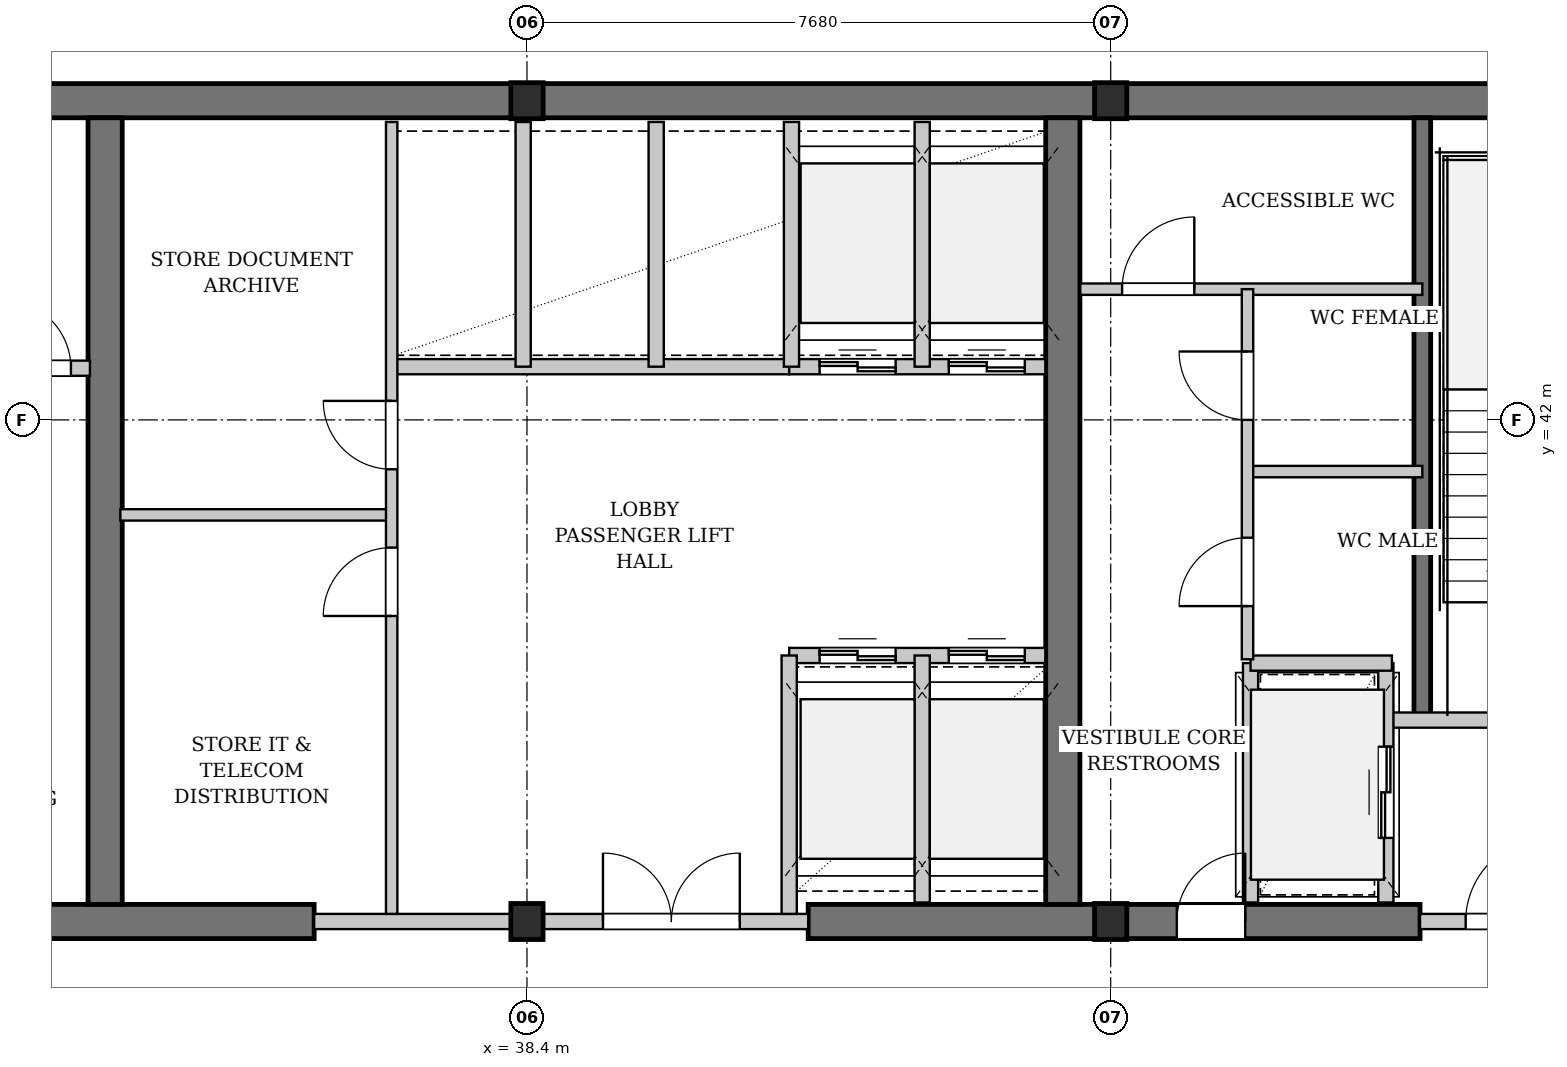
"""IFC4 building model, lengths in metres.
Left out: names, types, materials, properties, quantities, classifications, styles, units other than length and angle.
Written with IfcOpenShell. Run it as: python <this file> out.ifc"""

import sys

from ifc_helpers import new_model, si_unit, direction, frame, frame_2d, origin, origin_2d, place, context, subcontext, project, spatial, rectangle, i_section, extrude, element, fill, save


model = new_model("IFC4")
c1 = context("Model", 3, precision=1e-05, world=origin(), true_north=direction((0.0, 1.0)))
c2 = subcontext(c1, "Body", "Model", "MODEL_VIEW")
j1 = project(units=[si_unit("LENGTHUNIT", "METRE"), si_unit("PLANEANGLEUNIT", "RADIAN")], contexts=[c1])
p1 = place(None, origin())
s1 = spatial("IfcSite", under=j1, at=p1, CompositionType="ELEMENT")
p2 = place(p1, origin())
s2 = spatial("IfcBuilding", under=s1, at=p2, CompositionType="ELEMENT")
p3 = place(p2, frame((0.0, 0.0, 145.1)))
s3 = spatial("IfcBuildingStorey", under=s2, at=p3, CompositionType="ELEMENT", Elevation=145.1)
p4 = place(p3, frame((22.815, 46.2, 0.0), z_axis=(0.0, 0.0, 1.0), x_axis=(1.0, 0.0, 0.0)))
e1 = element("IfcWall", 1, at=p4, inside=s3, PredefinedType="SHEAR", context=c2, shape_type="SweptSolid", body=[
    extrude(rectangle(XDim=31.17, YDim=0.45, at=frame_2d((15.585, 0.0))), origin(), (0.0, 0.0, 1.0), 3.48),
])
p5 = place(p3, frame((30.72, 35.4, 0.0), z_axis=(0.0, 0.0, 1.0), x_axis=(1.0, 0.0, 0.0)))
e2 = element("IfcWall", 2, at=p5, inside=s3, PredefinedType="SHEAR", context=c2, shape_type="SweptSolid", body=[
    extrude(rectangle(XDim=4.88, YDim=0.45, at=frame_2d((2.44, 0.0))), origin(), (0.0, 0.0, 1.0), 3.48),
])
p6 = place(p3, frame((42.1, 35.4, 0.0), z_axis=(0.0, 0.0, 1.0), x_axis=(1.0, 0.0, 0.0)))
e3 = element("IfcWall", 3, at=p6, inside=s3, PredefinedType="SHEAR", context=c2, shape_type="SweptSolid", body=[
    extrude(rectangle(XDim=8.05, YDim=0.45, at=frame_2d((4.025, 0.0))), origin(), (0.0, 0.0, 1.0), 3.48),
])
p7 = place(p6, frame((4.85, 0.0, 0.0)))
e4 = element("IfcOpeningElement", 4, at=p7, cuts=e3, PredefinedType="OPENING", context=c2, shape_type="SweptSolid", body=[
    extrude(rectangle(XDim=0.9, YDim=2.15, at=frame_2d((0.45, 1.075))), frame((0.0, 0.235, 0.0), z_axis=(0.0, -1.0, 0.0), x_axis=(1.0, 0.0, 0.0)), (0.0, 0.0, 1.0), 0.47),
])
for number, where, z_axis, x_axis in (
    (5, (32.85, 35.625, 0.0), (0.0, 0.0, 1.0), (0.0, 1.0, 0.0)),
    (6, (45.45, 35.625, 0.0), (0.0, 0.0, 1.0), (0.0, 1.0, 0.0)),
):
    element("IfcWall", number, at=place(p3, frame(where, z_axis=z_axis, x_axis=x_axis)), inside=s3, PredefinedType="SHEAR", context=c2, shape_type="SweptSolid", body=[
        extrude(rectangle(XDim=10.35, YDim=0.45, at=frame_2d((5.175, 0.0))), origin(), (0.0, 0.0, 1.0), 3.48),
    ])
p8 = place(p3, frame((50.18, 38.05, 0.0), z_axis=(0.0, 0.0, 1.0), x_axis=(0.0, 1.0, 0.0)))
e7 = element("IfcWall", 7, at=p8, inside=s3, PredefinedType="SHEAR", context=c2, shape_type="SweptSolid", body=[
    extrude(rectangle(XDim=7.925, YDim=0.22, at=frame_2d((3.962, 0.0))), origin(), (0.0, 0.0, 1.0), 3.48),
])
for number, where, z_axis, x_axis in (
    (8, (38.4, 35.4, 0.0), (0.0, 0.0, 1.0), (1.0, 0.0, 0.0)),
    (9, (38.4, 46.2, 0.0), (0.0, 0.0, 1.0), (1.0, 0.0, 0.0)),
    (10, (46.08, 35.4, 0.0), (0.0, 0.0, 1.0), (1.0, 0.0, 0.0)),
    (11, (46.08, 46.2, 0.0), (0.0, 0.0, 1.0), (1.0, 0.0, 0.0)),
):
    element("IfcColumn", number, at=place(p3, frame(where, z_axis=z_axis, x_axis=x_axis)), inside=s3, PredefinedType="COLUMN", context=c2, shape_type="SweptSolid", body=[
        extrude(i_section(OverallWidth=0.424, OverallDepth=0.474, WebThickness=0.047, FlangeThickness=0.077, FilletRadius=0.015, at=origin_2d()), origin(), (0.0, 0.0, 1.0), 3.9),
    ])
p9 = place(p3, frame((27.32, 42.68, 0.0), z_axis=(0.0, 0.0, 1.0), x_axis=(1.0, 0.0, 0.0)))
e12 = element("IfcWall", 12, at=p9, inside=s3, PredefinedType="PARTITIONING", context=c2, shape_type="SweptSolid", body=[
    extrude(rectangle(XDim=5.33, YDim=0.2, at=frame_2d((2.665, 0.0))), origin(), (0.0, 0.0, 1.0), 3.48),
])
p10 = place(p9, frame((4.18, 0.0, 0.0)))
e13 = element("IfcOpeningElement", 13, at=p10, cuts=e12, PredefinedType="OPENING", context=c2, shape_type="SweptSolid", body=[
    extrude(rectangle(XDim=0.9, YDim=2.15, at=frame_2d((0.45, 1.075))), frame((0.0, 0.11, 0.0), z_axis=(0.0, -1.0, 0.0), x_axis=(1.0, 0.0, 0.0)), (0.0, 0.0, 1.0), 0.22),
])
p11 = place(p3, frame((35.6, 35.4, 0.0), z_axis=(0.0, 0.0, 1.0), x_axis=(1.0, 0.0, 0.0)))
e14 = element("IfcWall", 14, at=p11, inside=s3, PredefinedType="PARTITIONING", context=c2, shape_type="SweptSolid", body=[
    extrude(rectangle(XDim=6.5, YDim=0.2, at=frame_2d((3.25, 0.0))), origin(), (0.0, 0.0, 1.0), 2.565),
])
p12 = place(p11, frame((3.8, 0.0, 0.0)))
e15 = element("IfcOpeningElement", 15, at=p12, cuts=e14, PredefinedType="OPENING", context=c2, shape_type="SweptSolid", body=[
    extrude(rectangle(XDim=1.8, YDim=2.3, at=frame_2d((0.9, 1.15))), frame((0.0, 0.11, 0.0), z_axis=(0.0, -1.0, 0.0), x_axis=(1.0, 0.0, 0.0)), (0.0, 0.0, 1.0), 0.22),
])
p13 = place(p3, frame((36.6, 42.7, 0.0), z_axis=(0.0, 0.0, 1.0), x_axis=(1.0, 0.0, 0.0)))
e16 = element("IfcWall", 16, at=p13, inside=s3, PredefinedType="PARTITIONING", context=c2, shape_type="SweptSolid", body=[
    extrude(rectangle(XDim=5.25, YDim=0.2, at=frame_2d((2.625, 0.0))), origin(), (0.0, 0.0, 1.0), 3.48),
])
p14 = place(p3, frame((38.35, 42.7, 0.0), z_axis=(0.0, 0.0, 1.0), x_axis=(0.0, 1.0, 0.0)))
e17 = element("IfcWall", 17, at=p14, inside=s3, PredefinedType="PARTITIONING", context=c2, shape_type="SweptSolid", body=[
    extrude(rectangle(XDim=3.22, YDim=0.2, at=frame_2d((1.61, 0.0))), origin(), (0.0, 0.0, 1.0), 2.565),
])
p15 = place(p3, frame((40.1, 42.7, 0.0), z_axis=(0.0, 0.0, 1.0), x_axis=(0.0, 1.0, 0.0)))
e18 = element("IfcWall", 18, at=p15, inside=s3, PredefinedType="PARTITIONING", context=c2, shape_type="SweptSolid", body=[
    extrude(rectangle(XDim=3.22, YDim=0.2, at=frame_2d((1.61, 0.0))), origin(), (0.0, 0.0, 1.0), 3.48),
])
p16 = place(p3, frame((33.05, 40.75, 0.0), z_axis=(0.0, 0.0, 1.0), x_axis=(1.0, 0.0, 0.0)))
e19 = element("IfcWall", 19, at=p16, inside=s3, PredefinedType="PARTITIONING", context=c2, shape_type="SweptSolid", body=[
    extrude(rectangle(XDim=3.57, YDim=0.15, at=frame_2d((1.785, 0.0))), origin(), (0.0, 0.0, 1.0), 3.48),
])
p17 = place(p3, frame((36.62, 35.5, 0.0), z_axis=(0.0, 0.0, 1.0), x_axis=(0.0, 1.0, 0.0)))
e20 = element("IfcWall", 20, at=p17, inside=s3, PredefinedType="PARTITIONING", context=c2, shape_type="SweptSolid", body=[
    extrude(rectangle(XDim=10.42, YDim=0.15, at=frame_2d((5.21, 0.0))), origin(), (0.0, 0.0, 1.0), 3.48),
])
p18 = place(p17, frame((3.92, 0.0, 0.0)))
e21 = element("IfcOpeningElement", 21, at=p18, cuts=e20, PredefinedType="OPENING", context=c2, shape_type="SweptSolid", body=[
    extrude(rectangle(XDim=0.9, YDim=2.15, at=frame_2d((0.45, 1.075))), frame((0.0, 0.085, 0.0), z_axis=(0.0, -1.0, 0.0), x_axis=(1.0, 0.0, 0.0)), (0.0, 0.0, 1.0), 0.17),
])
p19 = place(p17, frame((5.85, 0.0, 0.0)))
e22 = element("IfcOpeningElement", 22, at=p19, cuts=e20, PredefinedType="OPENING", context=c2, shape_type="SweptSolid", body=[
    extrude(rectangle(XDim=0.9, YDim=2.15, at=frame_2d((0.45, 1.075))), frame((0.0, 0.085, 0.0), z_axis=(0.0, -1.0, 0.0), x_axis=(1.0, 0.0, 0.0)), (0.0, 0.0, 1.0), 0.17),
])
p20 = place(p3, frame((41.85, 38.9, 0.0), z_axis=(0.0, 0.0, 1.0), x_axis=(1.0, 0.0, 0.0)))
e23 = element("IfcWall", 23, at=p20, inside=s3, PredefinedType="PARTITIONING", context=c2, shape_type="SweptSolid", body=[
    extrude(rectangle(XDim=3.37, YDim=0.2, at=frame_2d((1.685, 0.0))), origin(), (0.0, 0.0, 1.0), 3.48),
])
p21 = place(p20, frame((0.4, 0.0, 0.0)))
e24 = element("IfcOpeningElement", 24, at=p21, cuts=e23, PredefinedType="OPENING", context=c2, shape_type="SweptSolid", body=[
    extrude(rectangle(XDim=1.0, YDim=2.2, at=frame_2d((0.5, 1.1))), frame((0.0, 0.11, 0.0), z_axis=(0.0, -1.0, 0.0), x_axis=(1.0, 0.0, 0.0)), (0.0, 0.0, 1.0), 0.22),
])
p22 = place(p20, frame((2.1, 0.0, 0.0)))
e25 = element("IfcOpeningElement", 25, at=p22, cuts=e23, PredefinedType="OPENING", context=c2, shape_type="SweptSolid", body=[
    extrude(rectangle(XDim=1.0, YDim=2.2, at=frame_2d((0.5, 1.1))), frame((0.0, 0.11, 0.0), z_axis=(0.0, -1.0, 0.0), x_axis=(1.0, 0.0, 0.0)), (0.0, 0.0, 1.0), 0.22),
])
p23 = place(p3, frame((41.85, 42.7, 0.0), z_axis=(0.0, 0.0, 1.0), x_axis=(1.0, 0.0, 0.0)))
e26 = element("IfcWall", 26, at=p23, inside=s3, PredefinedType="PARTITIONING", context=c2, shape_type="SweptSolid", body=[
    extrude(rectangle(XDim=3.37, YDim=0.2, at=frame_2d((1.685, 0.0))), origin(), (0.0, 0.0, 1.0), 3.48),
])
p24 = place(p23, frame((0.4, 0.0, 0.0)))
e27 = element("IfcOpeningElement", 27, at=p24, cuts=e26, PredefinedType="OPENING", context=c2, shape_type="SweptSolid", body=[
    extrude(rectangle(XDim=1.0, YDim=2.2, at=frame_2d((0.5, 1.1))), frame((0.0, 0.11, 0.0), z_axis=(0.0, -1.0, 0.0), x_axis=(1.0, 0.0, 0.0)), (0.0, 0.0, 1.0), 0.22),
])
p25 = place(p23, frame((2.1, 0.0, 0.0)))
e28 = element("IfcOpeningElement", 28, at=p25, cuts=e26, PredefinedType="OPENING", context=c2, shape_type="SweptSolid", body=[
    extrude(rectangle(XDim=1.0, YDim=2.2, at=frame_2d((0.5, 1.1))), frame((0.0, 0.11, 0.0), z_axis=(0.0, -1.0, 0.0), x_axis=(1.0, 0.0, 0.0)), (0.0, 0.0, 1.0), 0.22),
])
p26 = place(p3, frame((43.6, 35.65, 0.0), z_axis=(0.0, 0.0, 1.0), x_axis=(0.0, 1.0, 0.0)))
e29 = element("IfcWall", 29, at=p26, inside=s3, PredefinedType="PARTITIONING", context=c2, shape_type="SweptSolid", body=[
    extrude(rectangle(XDim=3.25, YDim=0.2, at=frame_2d((1.625, 0.0))), origin(), (0.0, 0.0, 1.0), 3.48),
])
p27 = place(p3, frame((43.6, 42.7, 0.0), z_axis=(0.0, 0.0, 1.0), x_axis=(0.0, 1.0, 0.0)))
e30 = element("IfcWall", 30, at=p27, inside=s3, PredefinedType="PARTITIONING", context=c2, shape_type="SweptSolid", body=[
    extrude(rectangle(XDim=3.22, YDim=0.2, at=frame_2d((1.61, 0.0))), origin(), (0.0, 0.0, 1.0), 3.48),
])
p28 = place(p3, frame((41.85, 35.5, 0.0), z_axis=(0.0, 0.0, 1.0), x_axis=(0.0, 1.0, 0.0)))
e31 = element("IfcWall", 31, at=p28, inside=s3, PredefinedType="PARTITIONING", context=c2, shape_type="SweptSolid", body=[
    extrude(rectangle(XDim=3.4, YDim=0.2, at=frame_2d((1.7, 0.0))), origin(), (0.0, 0.0, 1.0), 3.48),
])
p29 = place(p3, frame((41.88, 42.7, 0.0), z_axis=(0.0, 0.0, 1.0), x_axis=(0.0, 1.0, 0.0)))
e32 = element("IfcWall", 32, at=p29, inside=s3, PredefinedType="PARTITIONING", context=c2, shape_type="SweptSolid", body=[
    extrude(rectangle(XDim=3.22, YDim=0.2, at=frame_2d((1.61, 0.0))), origin(), (0.0, 0.0, 1.0), 3.48),
])
p30 = place(p3, frame((49.78, 38.05, 0.0), z_axis=(0.0, 0.0, 1.0), x_axis=(1.0, 0.0, 0.0)))
e33 = element("IfcWall", 33, at=p30, inside=s3, PredefinedType="PARTITIONING", context=c2, shape_type="SweptSolid", body=[
    extrude(rectangle(XDim=3.72, YDim=0.2, at=frame_2d((1.86, 0.0))), origin(), (0.0, 0.0, 1.0), 3.48),
])
p31 = place(p30, frame((1.436, 0.0, 0.0)))
e34 = element("IfcOpeningElement", 34, at=p31, cuts=e33, PredefinedType="OPENING", context=c2, shape_type="SweptSolid", body=[
    extrude(rectangle(XDim=1.1, YDim=2.15, at=frame_2d((0.55, 1.075))), frame((0.0, 0.11, 0.0), z_axis=(0.0, -1.0, 0.0), x_axis=(1.0, 0.0, 0.0)), (0.0, 0.0, 1.0), 0.22),
])
p32 = place(p3, frame((50.15, 35.4, 0.0), z_axis=(0.0, 0.0, 1.0), x_axis=(1.0, 0.0, 0.0)))
e35 = element("IfcWall", 35, at=p32, inside=s3, PredefinedType="PARTITIONING", context=c2, shape_type="SweptSolid", body=[
    extrude(rectangle(XDim=2.3, YDim=0.2, at=frame_2d((1.15, 0.0))), origin(), (0.0, 0.0, 1.0), 2.565),
])
p33 = place(p32, frame((0.6, 0.0, 0.0)))
e36 = element("IfcOpeningElement", 36, at=p33, cuts=e35, PredefinedType="OPENING", context=c2, shape_type="SweptSolid", body=[
    extrude(rectangle(XDim=1.1, YDim=2.15, at=frame_2d((0.55, 1.075))), frame((0.0, 0.11, 0.0), z_axis=(0.0, -1.0, 0.0), x_axis=(1.0, 0.0, 0.0)), (0.0, 0.0, 1.0), 0.22),
])
p34 = place(p3, frame((49.7, 35.65, 0.0), z_axis=(0.0, 0.0, 1.0), x_axis=(0.0, 1.0, 0.0)))
e37 = element("IfcWall", 37, at=p34, inside=s3, PredefinedType="PARTITIONING", context=c2, shape_type="SweptSolid", body=[
    extrude(rectangle(XDim=3.15, YDim=0.2, at=frame_2d((1.575, 0.0))), origin(), (0.0, 0.0, 1.0), 3.48),
])
p35 = place(p34, frame((0.85, 0.0, 0.0)))
e38 = element("IfcOpeningElement", 38, at=p35, cuts=e37, PredefinedType="OPENING", context=c2, shape_type="SweptSolid", body=[
    extrude(rectangle(XDim=1.2, YDim=2.2, at=frame_2d((0.6, 1.1))), frame((0.0, 0.11, 0.0), z_axis=(0.0, -1.0, 0.0), x_axis=(1.0, 0.0, 0.0)), (0.0, 0.0, 1.0), 0.22),
])
p36 = place(p3, frame((47.92, 35.65, 0.0), z_axis=(0.0, 0.0, 1.0), x_axis=(0.0, 1.0, 0.0)))
e39 = element("IfcWall", 39, at=p36, inside=s3, PredefinedType="PARTITIONING", context=c2, shape_type="SweptSolid", body=[
    extrude(rectangle(XDim=3.15, YDim=0.2, at=frame_2d((1.575, 0.0))), origin(), (0.0, 0.0, 1.0), 3.48),
])
p37 = place(p3, frame((47.92, 38.8, 0.0), z_axis=(0.0, 0.0, 1.0), x_axis=(1.0, 0.0, 0.0)))
e40 = element("IfcWall", 40, at=p37, inside=s3, PredefinedType="PARTITIONING", context=c2, shape_type="SweptSolid", body=[
    extrude(rectangle(XDim=1.86, YDim=0.2, at=frame_2d((0.93, 0.0))), origin(), (0.0, 0.0, 1.0), 3.48),
])
p38 = place(p3, frame((45.68, 43.72, 0.0), z_axis=(0.0, 0.0, 1.0), x_axis=(1.0, 0.0, 0.0)))
e41 = element("IfcWall", 41, at=p38, inside=s3, PredefinedType="PARTITIONING", context=c2, shape_type="SweptSolid", body=[
    extrude(rectangle(XDim=4.5, YDim=0.15, at=frame_2d((2.25, 0.0))), origin(), (0.0, 0.0, 1.0), 3.48),
])
p39 = place(p38, frame((0.55, 0.0, 0.0)))
e42 = element("IfcOpeningElement", 42, at=p39, cuts=e41, PredefinedType="OPENING", context=c2, shape_type="SweptSolid", body=[
    extrude(rectangle(XDim=0.95, YDim=2.15, at=frame_2d((0.475, 1.075))), frame((0.0, 0.085, 0.0), z_axis=(0.0, -1.0, 0.0), x_axis=(1.0, 0.0, 0.0)), (0.0, 0.0, 1.0), 0.17),
])
p40 = place(p3, frame((47.88, 41.32, 0.0), z_axis=(0.0, 0.0, 1.0), x_axis=(1.0, 0.0, 0.0)))
e43 = element("IfcWall", 43, at=p40, inside=s3, PredefinedType="PARTITIONING", context=c2, shape_type="SweptSolid", body=[
    extrude(rectangle(XDim=2.3, YDim=0.15, at=frame_2d((1.15, 0.0))), origin(), (0.0, 0.0, 1.0), 3.48),
])
p41 = place(p3, frame((47.88, 38.85, 0.0), z_axis=(0.0, 0.0, 1.0), x_axis=(0.0, 1.0, 0.0)))
e44 = element("IfcWall", 44, at=p41, inside=s3, PredefinedType="PARTITIONING", context=c2, shape_type="SweptSolid", body=[
    extrude(rectangle(XDim=4.87, YDim=0.15, at=frame_2d((2.435, 0.0))), origin(), (0.0, 0.0, 1.0), 3.48),
])
p42 = place(p41, frame((0.7, 0.0, 0.0)))
e45 = element("IfcOpeningElement", 45, at=p42, cuts=e44, PredefinedType="OPENING", context=c2, shape_type="SweptSolid", body=[
    extrude(rectangle(XDim=0.9, YDim=2.15, at=frame_2d((0.45, 1.075))), frame((0.0, 0.085, 0.0), z_axis=(0.0, -1.0, 0.0), x_axis=(1.0, 0.0, 0.0)), (0.0, 0.0, 1.0), 0.17),
])
p43 = place(p41, frame((3.15, 0.0, 0.0)))
e46 = element("IfcOpeningElement", 46, at=p43, cuts=e44, PredefinedType="OPENING", context=c2, shape_type="SweptSolid", body=[
    extrude(rectangle(XDim=0.9, YDim=2.15, at=frame_2d((0.45, 1.075))), frame((0.0, 0.085, 0.0), z_axis=(0.0, -1.0, 0.0), x_axis=(1.0, 0.0, 0.0)), (0.0, 0.0, 1.0), 0.17),
])
p44 = place(p10, origin())
e47 = element("IfcDoor", 47, at=p44, inside=s3, OperationType="SINGLE_SWING_LEFT", PredefinedType="DOOR", context=c2, shape_type="SweptSolid", body=[
    extrude(rectangle(XDim=0.9, YDim=2.15, at=frame_2d((0.45, 1.075))), frame((0.0, 0.025, 0.0), z_axis=(0.0, -1.0, 0.0), x_axis=(1.0, 0.0, 0.0)), (0.0, 0.0, 1.0), 0.05),
])
fill(e13, e47)
p45 = place(p12, origin())
e48 = element("IfcDoor", 48, at=p45, inside=s3, OperationType="DOUBLE_DOOR_SINGLE_SWING", PredefinedType="DOOR", context=c2, shape_type="SweptSolid", body=[
    extrude(rectangle(XDim=1.8, YDim=2.3, at=frame_2d((0.9, 1.15))), frame((0.0, 0.025, 0.0), z_axis=(0.0, -1.0, 0.0), x_axis=(1.0, 0.0, 0.0)), (0.0, 0.0, 1.0), 0.05),
])
fill(e15, e48)
p46 = place(p18, origin())
e49 = element("IfcDoor", 49, at=p46, inside=s3, OperationType="SINGLE_SWING_LEFT", PredefinedType="DOOR", context=c2, shape_type="SweptSolid", body=[
    extrude(rectangle(XDim=0.9, YDim=2.15, at=frame_2d((0.45, 1.075))), frame((0.0, 0.025, 0.0), z_axis=(0.0, -1.0, 0.0), x_axis=(1.0, 0.0, 0.0)), (0.0, 0.0, 1.0), 0.05),
])
fill(e21, e49)
p47 = place(p19, origin())
e50 = element("IfcDoor", 50, at=p47, inside=s3, OperationType="SINGLE_SWING_RIGHT", PredefinedType="DOOR", context=c2, shape_type="SweptSolid", body=[
    extrude(rectangle(XDim=0.9, YDim=2.15, at=frame_2d((0.45, 1.075))), frame((0.0, 0.025, 0.0), z_axis=(0.0, -1.0, 0.0), x_axis=(1.0, 0.0, 0.0)), (0.0, 0.0, 1.0), 0.05),
])
fill(e22, e50)
p48 = place(p21, origin())
e51 = element("IfcDoor", 51, at=p48, inside=s3, OperationType="DOUBLE_DOOR_SLIDING", PredefinedType="DOOR", context=c2, shape_type="SweptSolid", body=[
    extrude(rectangle(XDim=1.0, YDim=2.2, at=frame_2d((0.5, 1.1))), frame((0.0, 0.025, 0.0), z_axis=(0.0, -1.0, 0.0), x_axis=(1.0, 0.0, 0.0)), (0.0, 0.0, 1.0), 0.05),
])
fill(e24, e51)
p49 = place(p22, origin())
e52 = element("IfcDoor", 52, at=p49, inside=s3, OperationType="DOUBLE_DOOR_SLIDING", PredefinedType="DOOR", context=c2, shape_type="SweptSolid", body=[
    extrude(rectangle(XDim=1.0, YDim=2.2, at=frame_2d((0.5, 1.1))), frame((0.0, 0.025, 0.0), z_axis=(0.0, -1.0, 0.0), x_axis=(1.0, 0.0, 0.0)), (0.0, 0.0, 1.0), 0.05),
])
fill(e25, e52)
p50 = place(p24, origin())
e53 = element("IfcDoor", 53, at=p50, inside=s3, OperationType="DOUBLE_DOOR_SLIDING", PredefinedType="DOOR", context=c2, shape_type="SweptSolid", body=[
    extrude(rectangle(XDim=1.0, YDim=2.2, at=frame_2d((0.5, 1.1))), frame((0.0, 0.025, 0.0), z_axis=(0.0, -1.0, 0.0), x_axis=(1.0, 0.0, 0.0)), (0.0, 0.0, 1.0), 0.05),
])
fill(e27, e53)
p51 = place(p25, origin())
e54 = element("IfcDoor", 54, at=p51, inside=s3, OperationType="DOUBLE_DOOR_SLIDING", PredefinedType="DOOR", context=c2, shape_type="SweptSolid", body=[
    extrude(rectangle(XDim=1.0, YDim=2.2, at=frame_2d((0.5, 1.1))), frame((0.0, 0.025, 0.0), z_axis=(0.0, -1.0, 0.0), x_axis=(1.0, 0.0, 0.0)), (0.0, 0.0, 1.0), 0.05),
])
fill(e28, e54)
p52 = place(p33, origin())
e55 = element("IfcDoor", 55, at=p52, inside=s3, OperationType="SINGLE_SWING_RIGHT", PredefinedType="DOOR", context=c2, shape_type="SweptSolid", body=[
    extrude(rectangle(XDim=1.1, YDim=2.15, at=frame_2d((0.55, 1.075))), frame((0.0, 0.025, 0.0), z_axis=(0.0, -1.0, 0.0), x_axis=(1.0, 0.0, 0.0)), (0.0, 0.0, 1.0), 0.05),
])
fill(e36, e55)
p53 = place(p35, origin())
e56 = element("IfcDoor", 56, at=p53, inside=s3, OperationType="DOUBLE_DOOR_SLIDING", PredefinedType="DOOR", context=c2, shape_type="SweptSolid", body=[
    extrude(rectangle(XDim=1.2, YDim=2.2, at=frame_2d((0.6, 1.1))), frame((0.0, 0.025, 0.0), z_axis=(0.0, -1.0, 0.0), x_axis=(1.0, 0.0, 0.0)), (0.0, 0.0, 1.0), 0.05),
])
fill(e38, e56)
p54 = place(p39, origin())
e57 = element("IfcDoor", 57, at=p54, inside=s3, OperationType="SINGLE_SWING_RIGHT", PredefinedType="DOOR", context=c2, shape_type="SweptSolid", body=[
    extrude(rectangle(XDim=0.95, YDim=2.15, at=frame_2d((0.475, 1.075))), frame((0.0, 0.025, 0.0), z_axis=(0.0, -1.0, 0.0), x_axis=(1.0, 0.0, 0.0)), (0.0, 0.0, 1.0), 0.05),
])
fill(e42, e57)
p55 = place(p42, origin())
e58 = element("IfcDoor", 58, at=p55, inside=s3, OperationType="SINGLE_SWING_LEFT", PredefinedType="DOOR", context=c2, shape_type="SweptSolid", body=[
    extrude(rectangle(XDim=0.9, YDim=2.15, at=frame_2d((0.45, 1.075))), frame((0.0, 0.025, 0.0), z_axis=(0.0, -1.0, 0.0), x_axis=(1.0, 0.0, 0.0)), (0.0, 0.0, 1.0), 0.05),
])
fill(e45, e58)
p56 = place(p43, origin())
e59 = element("IfcDoor", 59, at=p56, inside=s3, OperationType="SINGLE_SWING_RIGHT", PredefinedType="DOOR", context=c2, shape_type="SweptSolid", body=[
    extrude(rectangle(XDim=0.9, YDim=2.15, at=frame_2d((0.45, 1.075))), frame((0.0, 0.025, 0.0), z_axis=(0.0, -1.0, 0.0), x_axis=(1.0, 0.0, 0.0)), (0.0, 0.0, 1.0), 0.05),
])
fill(e46, e59)
p57 = place(p7, origin())
e60 = element("IfcDoor", 60, at=p57, inside=s3, OperationType="SINGLE_SWING_RIGHT", PredefinedType="DOOR", context=c2, shape_type="SweptSolid", body=[
    extrude(rectangle(XDim=0.9, YDim=2.15, at=frame_2d((0.45, 1.075))), frame((0.0, 0.025, 0.0), z_axis=(0.0, -1.0, 0.0), x_axis=(1.0, 0.0, 0.0)), (0.0, 0.0, 1.0), 0.05),
])
fill(e4, e60)
save(model, sys.argv[1])
